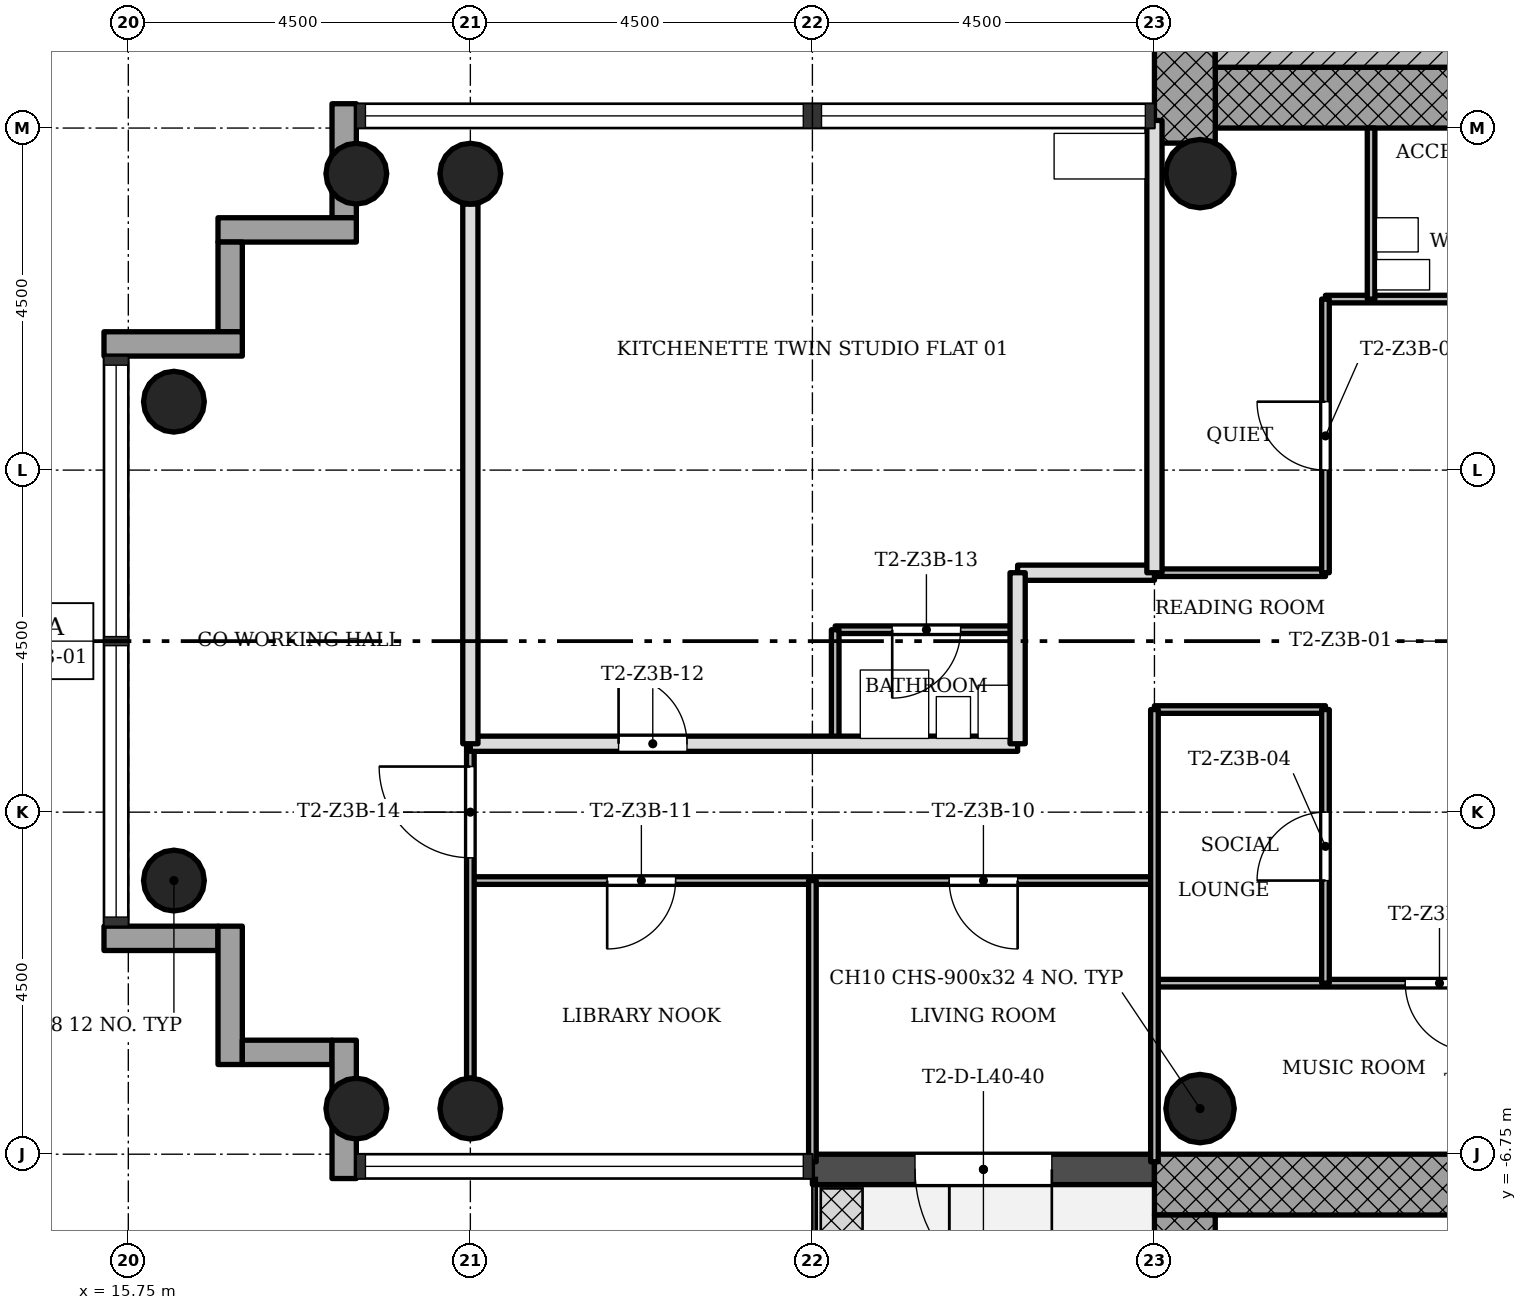
"""IFC4 building model, lengths in metres.
Left out: names, types, materials, properties, quantities, classifications, styles, units other than length and angle.
Written with IfcOpenShell. Run it as: python <this file> out.ifc"""

import sys

from ifc_helpers import new_model, si_unit, direction, frame, frame_2d, origin, origin_2d, place, context, subcontext, project, spatial, rectangle, hollow_circle, extrude, element, fill, save


model = new_model("IFC4")
c1 = context("Model", 3, precision=1e-05, world=origin(), true_north=direction((0.0, 1.0)))
c2 = subcontext(c1, "Body", "Model", "MODEL_VIEW")
j1 = project(units=[si_unit("LENGTHUNIT", "METRE"), si_unit("PLANEANGLEUNIT", "RADIAN")], contexts=[c1])
p1 = place(None, origin())
s1 = spatial("IfcSite", under=j1, at=p1, CompositionType="ELEMENT")
p2 = place(p1, origin())
s2 = spatial("IfcBuilding", under=s1, at=p2, CompositionType="ELEMENT")
p3 = place(p2, frame((0.0, 0.0, 147.3)))
s3 = spatial("IfcBuildingStorey", under=s2, at=p3, CompositionType="ELEMENT", Elevation=147.3)
p4 = place(p3, frame((30.05, 7.15, 0.0), z_axis=(0.0, 0.0, 1.0), x_axis=(1.0, 0.0, 0.0)))
e1 = element("IfcWall", 1, at=p4, inside=s3, PredefinedType="SHEAR", context=c2, shape_type="SweptSolid", body=[
    extrude(rectangle(XDim=12.7, YDim=0.8, at=frame_2d((6.35, 0.0))), origin(), (0.0, 0.0, 1.0), 3.4),
])
p5 = place(p4, frame((5.05, 0.0, 0.0)))
e2 = element("IfcOpeningElement", 2, at=p5, cuts=e1, PredefinedType="OPENING", context=c2, shape_type="SweptSolid", body=[
    extrude(rectangle(XDim=1.8, YDim=2.1, at=frame_2d((0.9, 1.05))), frame((0.0, 0.41, 0.0), z_axis=(0.0, -1.0, 0.0), x_axis=(1.0, 0.0, 0.0)), (0.0, 0.0, 1.0), 0.82),
])
p6 = place(p3, frame((29.65, 15.348, 0.0), z_axis=(0.0, 0.0, 1.0), x_axis=(0.0, -1.0, 0.0)))
e3 = element("IfcWall", 3, at=p6, inside=s3, PredefinedType="SHEAR", context=c2, shape_type="SweptSolid", body=[
    extrude(rectangle(XDim=8.796, YDim=0.8, at=frame_2d((4.398, 0.0))), origin(), (0.0, 0.0, 1.0), 3.4),
])
p7 = place(p3, frame((41.95, -7.15, 0.0), z_axis=(0.0, 0.0, 1.0), x_axis=(-1.0, 0.0, 0.0)))
e4 = element("IfcWall", 4, at=p7, inside=s3, PredefinedType="SHEAR", context=c2, shape_type="SweptSolid", body=[
    extrude(rectangle(XDim=12.7, YDim=0.8, at=frame_2d((6.35, 0.0))), origin(), (0.0, 0.0, 1.0), 3.4),
])
p8 = place(p7, frame((5.05, 0.0, 0.0)))
e5 = element("IfcOpeningElement", 5, at=p8, cuts=e4, PredefinedType="OPENING", context=c2, shape_type="SweptSolid", body=[
    extrude(rectangle(XDim=1.8, YDim=2.1, at=frame_2d((0.9, 1.05))), frame((0.0, 0.41, 0.0), z_axis=(0.0, -1.0, 0.0), x_axis=(1.0, 0.0, 0.0)), (0.0, 0.0, 1.0), 0.82),
])
p9 = place(p3, frame((29.65, -7.55, 0.0), z_axis=(0.0, 0.0, 1.0), x_axis=(0.0, -1.0, 0.0)))
e6 = element("IfcWall", 6, at=p9, inside=s3, PredefinedType="SHEAR", context=c2, shape_type="SweptSolid", body=[
    extrude(rectangle(XDim=8.2, YDim=0.8, at=frame_2d((4.1, 0.0))), origin(), (0.0, 0.0, 1.0), 3.4),
])
for number, where, z_axis, x_axis in (
    (7, (20.25, 6.15, 0.0), (0.0, 0.0, 1.0), (1.0, 0.0, 0.0)),
    (8, (20.25, -6.15, 0.0), (0.0, 0.0, 1.0), (1.0, 0.0, 0.0)),
    (9, (18.75, 6.15, 0.0), (0.0, 0.0, 1.0), (1.0, 0.0, 0.0)),
    (10, (18.75, -6.15, 0.0), (0.0, 0.0, 1.0), (1.0, 0.0, 0.0)),
    (11, (16.35, 3.15, 0.0), (0.0, 0.0, 1.0), (1.0, 0.0, 0.0)),
    (12, (16.35, -3.15, 0.0), (0.0, 0.0, 1.0), (1.0, 0.0, 0.0)),
):
    element("IfcColumn", number, at=place(p3, frame(where, z_axis=z_axis, x_axis=x_axis)), inside=s3, PredefinedType="COLUMN", context=c2, shape_type="SweptSolid", body=[
        extrude(hollow_circle(Radius=0.4, WallThickness=0.028, at=origin_2d()), origin(), (0.0, 0.0, 1.0), 3.4),
    ])
for number, where, z_axis, x_axis in (
    (13, (29.85, 6.15, 0.0), (0.0, 0.0, 1.0), (1.0, 0.0, 0.0)),
    (14, (29.85, -6.15, 0.0), (0.0, 0.0, 1.0), (1.0, 0.0, 0.0)),
):
    element("IfcColumn", number, at=place(p3, frame(where, z_axis=z_axis, x_axis=x_axis)), inside=s3, PredefinedType="COLUMN", context=c2, shape_type="SweptSolid", body=[
        extrude(hollow_circle(Radius=0.45, WallThickness=0.032, at=origin_2d()), origin(), (0.0, 0.0, 1.0), 3.4),
    ])
p10 = place(p3, frame((18.59, 7.07, -0.3), z_axis=(0.0, 0.0, 1.0), x_axis=(0.0, -1.0, 0.0)))
e15 = element("IfcWall", 15, at=p10, inside=s3, PredefinedType="STANDARD", context=c2, shape_type="SweptSolid", body=[
    extrude(rectangle(XDim=1.5, YDim=0.32, at=frame_2d((0.75, 0.0))), origin(), (0.0, 0.0, 1.0), 3.4),
])
p11 = place(p3, frame((18.75, 5.41, -0.3), z_axis=(0.0, 0.0, 1.0), x_axis=(-1.0, 0.0, 0.0)))
e16 = element("IfcWall", 16, at=p11, inside=s3, PredefinedType="STANDARD", context=c2, shape_type="SweptSolid", body=[
    extrude(rectangle(XDim=1.82, YDim=0.32, at=frame_2d((0.91, 0.0))), origin(), (0.0, 0.0, 1.0), 3.4),
])
p12 = place(p3, frame((17.09, 5.25, -0.3), z_axis=(0.0, 0.0, 1.0), x_axis=(0.0, -1.0, 0.0)))
e17 = element("IfcWall", 17, at=p12, inside=s3, PredefinedType="STANDARD", context=c2, shape_type="SweptSolid", body=[
    extrude(rectangle(XDim=1.18, YDim=0.32, at=frame_2d((0.59, 0.0))), origin(), (0.0, 0.0, 1.0), 3.4),
])
p13 = place(p3, frame((17.25, 3.91, -0.3), z_axis=(0.0, 0.0, 1.0), x_axis=(-1.0, 0.0, 0.0)))
e18 = element("IfcWall", 18, at=p13, inside=s3, PredefinedType="STANDARD", context=c2, shape_type="SweptSolid", body=[
    extrude(rectangle(XDim=1.82, YDim=0.32, at=frame_2d((0.91, 0.0))), origin(), (0.0, 0.0, 1.0), 3.4),
])
p14 = place(p3, frame((15.43, -3.91, -0.3), z_axis=(0.0, 0.0, 1.0), x_axis=(1.0, 0.0, 0.0)))
e19 = element("IfcWall", 19, at=p14, inside=s3, PredefinedType="STANDARD", context=c2, shape_type="SweptSolid", body=[
    extrude(rectangle(XDim=1.5, YDim=0.32, at=frame_2d((0.75, 0.0))), origin(), (0.0, 0.0, 1.0), 3.4),
])
p15 = place(p3, frame((17.09, -3.75, -0.3), z_axis=(0.0, 0.0, 1.0), x_axis=(0.0, -1.0, 0.0)))
e20 = element("IfcWall", 20, at=p15, inside=s3, PredefinedType="STANDARD", context=c2, shape_type="SweptSolid", body=[
    extrude(rectangle(XDim=1.82, YDim=0.32, at=frame_2d((0.91, 0.0))), origin(), (0.0, 0.0, 1.0), 3.4),
])
p16 = place(p3, frame((17.25, -5.41, -0.3), z_axis=(0.0, 0.0, 1.0), x_axis=(1.0, 0.0, 0.0)))
e21 = element("IfcWall", 21, at=p16, inside=s3, PredefinedType="STANDARD", context=c2, shape_type="SweptSolid", body=[
    extrude(rectangle(XDim=1.18, YDim=0.32, at=frame_2d((0.59, 0.0))), origin(), (0.0, 0.0, 1.0), 3.4),
])
p17 = place(p3, frame((18.59, -5.25, -0.3), z_axis=(0.0, 0.0, 1.0), x_axis=(0.0, -1.0, 0.0)))
e22 = element("IfcWall", 22, at=p17, inside=s3, PredefinedType="STANDARD", context=c2, shape_type="SweptSolid", body=[
    extrude(rectangle(XDim=1.82, YDim=0.32, at=frame_2d((0.91, 0.0))), origin(), (0.0, 0.0, 1.0), 3.4),
])
p18 = place(p3, frame((24.75, -6.95, -0.02), z_axis=(0.0, 0.0, 1.0), x_axis=(1.0, 0.0, 0.0)))
e23 = element("IfcWall", 23, at=p18, inside=s3, PredefinedType="STANDARD", context=c2, shape_type="SweptSolid", body=[
    extrude(rectangle(XDim=4.5, YDim=0.4, at=frame_2d((2.25, 0.0))), origin(), (0.0, 0.0, 1.0), 3.12),
])
p19 = place(p18, frame((1.35, 0.0, 0.02)))
e24 = element("IfcOpeningElement", 24, at=p19, cuts=e23, PredefinedType="OPENING", context=c2, shape_type="SweptSolid", body=[
    extrude(rectangle(XDim=1.8, YDim=2.1, at=frame_2d((0.9, 1.05))), frame((0.0, 0.21, 0.0), z_axis=(0.0, -1.0, 0.0), x_axis=(1.0, 0.0, 0.0)), (0.0, 0.0, 1.0), 0.42),
])
p20 = place(p3, frame((34.5, -4.5, 0.0), z_axis=(0.0, 0.0, 1.0), x_axis=(-1.0, 0.0, 0.0)))
e25 = element("IfcWall", 25, at=p20, inside=s3, PredefinedType="PARTITIONING", context=c2, shape_type="SweptSolid", body=[
    extrude(rectangle(XDim=5.25, YDim=0.1, at=frame_2d((2.625, 0.0))), origin(), (0.0, 0.0, 1.0), 3.0),
])
p21 = place(p20, frame((1.05, 0.0, 0.0)))
e26 = element("IfcOpeningElement", 26, at=p21, cuts=e25, PredefinedType="OPENING", context=c2, shape_type="SweptSolid", body=[
    extrude(rectangle(XDim=0.9, YDim=2.1, at=frame_2d((0.45, 1.05))), frame((0.0, 0.06, 0.0), z_axis=(0.0, -1.0, 0.0), x_axis=(1.0, 0.0, 0.0)), (0.0, 0.0, 1.0), 0.12),
])
p22 = place(p3, frame((29.25, -3.15, 0.0), z_axis=(0.0, 0.0, 1.0), x_axis=(-1.0, 0.0, 0.0)))
e27 = element("IfcWall", 27, at=p22, inside=s3, PredefinedType="PARTITIONING", context=c2, shape_type="SweptSolid", body=[
    extrude(rectangle(XDim=9.0, YDim=0.1, at=frame_2d((4.5, 0.0))), origin(), (0.0, 0.0, 1.0), 3.0),
])
p23 = place(p22, frame((1.8, 0.0, 0.0)))
e28 = element("IfcOpeningElement", 28, at=p23, cuts=e27, PredefinedType="OPENING", context=c2, shape_type="SweptSolid", body=[
    extrude(rectangle(XDim=0.9, YDim=2.1, at=frame_2d((0.45, 1.05))), frame((0.0, 0.06, 0.0), z_axis=(0.0, -1.0, 0.0), x_axis=(1.0, 0.0, 0.0)), (0.0, 0.0, 1.0), 0.12),
])
p24 = place(p22, frame((6.3, 0.0, 0.0)))
e29 = element("IfcOpeningElement", 29, at=p24, cuts=e27, PredefinedType="OPENING", context=c2, shape_type="SweptSolid", body=[
    extrude(rectangle(XDim=0.9, YDim=2.1, at=frame_2d((0.45, 1.05))), frame((0.0, 0.06, 0.0), z_axis=(0.0, -1.0, 0.0), x_axis=(1.0, 0.0, 0.0)), (0.0, 0.0, 1.0), 0.12),
])
p25 = place(p3, frame((27.45, -1.35, 0.0), z_axis=(0.0, 0.0, 1.0), x_axis=(-1.0, 0.0, 0.0)))
e30 = element("IfcWall", 30, at=p25, inside=s3, PredefinedType="SOLIDWALL", context=c2, shape_type="SweptSolid", body=[
    extrude(rectangle(XDim=7.2, YDim=0.2, at=frame_2d((3.6, 0.0))), origin(), (0.0, 0.0, 1.0), 3.0),
])
p26 = place(p25, frame((4.35, 0.0, 0.0)))
e31 = element("IfcOpeningElement", 31, at=p26, cuts=e30, PredefinedType="OPENING", context=c2, shape_type="SweptSolid", body=[
    extrude(rectangle(XDim=0.9, YDim=2.1, at=frame_2d((0.45, 1.05))), frame((0.0, 0.11, 0.0), z_axis=(0.0, -1.0, 0.0), x_axis=(1.0, 0.0, 0.0)), (0.0, 0.0, 1.0), 0.22),
])
p27 = place(p3, frame((31.5, -0.9, 0.0), z_axis=(0.0, 0.0, 1.0), x_axis=(-1.0, 0.0, 0.0)))
e32 = element("IfcWall", 32, at=p27, inside=s3, PredefinedType="PARTITIONING", context=c2, shape_type="SweptSolid", body=[
    extrude(rectangle(XDim=2.25, YDim=0.1, at=frame_2d((1.125, 0.0))), origin(), (0.0, 0.0, 1.0), 3.0),
])
p28 = place(p3, frame((27.45, 0.15, 0.0), z_axis=(0.0, 0.0, 1.0), x_axis=(-1.0, 0.0, 0.0)))
e33 = element("IfcWall", 33, at=p28, inside=s3, PredefinedType="PARTITIONING", context=c2, shape_type="SweptSolid", body=[
    extrude(rectangle(XDim=2.4, YDim=0.1, at=frame_2d((1.2, 0.0))), origin(), (0.0, 0.0, 1.0), 3.0),
])
p29 = place(p28, frame((0.75, 0.0, 0.0)))
e34 = element("IfcOpeningElement", 34, at=p29, cuts=e33, PredefinedType="OPENING", context=c2, shape_type="SweptSolid", body=[
    extrude(rectangle(XDim=0.9, YDim=2.1, at=frame_2d((0.45, 1.05))), frame((0.0, 0.06, 0.0), z_axis=(0.0, -1.0, 0.0), x_axis=(1.0, 0.0, 0.0)), (0.0, 0.0, 1.0), 0.12),
])
p30 = place(p3, frame((31.5, 0.9, 0.0), z_axis=(0.0, 0.0, 1.0), x_axis=(-1.0, 0.0, 0.0)))
e35 = element("IfcWall", 35, at=p30, inside=s3, PredefinedType="PARTITIONING", context=c2, shape_type="SweptSolid", body=[
    extrude(rectangle(XDim=2.25, YDim=0.1, at=frame_2d((1.125, 0.0))), origin(), (0.0, 0.0, 1.0), 3.0),
])
p31 = place(p3, frame((29.25, 0.9, 0.0), z_axis=(0.0, 0.0, 1.0), x_axis=(-1.0, 0.0, 0.0)))
e36 = element("IfcWall", 36, at=p31, inside=s3, PredefinedType="SOLIDWALL", context=c2, shape_type="SweptSolid", body=[
    extrude(rectangle(XDim=1.8, YDim=0.2, at=frame_2d((0.9, 0.0))), origin(), (0.0, 0.0, 1.0), 3.0),
])
p32 = place(p3, frame((34.5, 4.5, 0.0), z_axis=(0.0, 0.0, 1.0), x_axis=(-1.0, 0.0, 0.0)))
e37 = element("IfcWall", 37, at=p32, inside=s3, PredefinedType="PARTITIONING", context=c2, shape_type="SweptSolid", body=[
    extrude(rectangle(XDim=3.0, YDim=0.1, at=frame_2d((1.5, 0.0))), origin(), (0.0, 0.0, 1.0), 3.0),
])
p33 = place(p3, frame((32.1, 4.5, 0.0), z_axis=(0.0, 0.0, 1.0), x_axis=(0.0, 1.0, 0.0)))
e38 = element("IfcWall", 38, at=p33, inside=s3, PredefinedType="PARTITIONING", context=c2, shape_type="SweptSolid", body=[
    extrude(rectangle(XDim=2.25, YDim=0.1, at=frame_2d((1.125, 0.0))), origin(), (0.0, 0.0, 1.0), 3.0),
])
p34 = place(p3, frame((31.5, -4.5, 0.0), z_axis=(0.0, 0.0, 1.0), x_axis=(0.0, 1.0, 0.0)))
e39 = element("IfcWall", 39, at=p34, inside=s3, PredefinedType="PARTITIONING", context=c2, shape_type="SweptSolid", body=[
    extrude(rectangle(XDim=3.6, YDim=0.1, at=frame_2d((1.8, 0.0))), origin(), (0.0, 0.0, 1.0), 3.0),
])
p35 = place(p34, frame((1.35, 0.0, 0.0)))
e40 = element("IfcOpeningElement", 40, at=p35, cuts=e39, PredefinedType="OPENING", context=c2, shape_type="SweptSolid", body=[
    extrude(rectangle(XDim=0.9, YDim=2.1, at=frame_2d((0.45, 1.05))), frame((0.0, 0.06, 0.0), z_axis=(0.0, -1.0, 0.0), x_axis=(1.0, 0.0, 0.0)), (0.0, 0.0, 1.0), 0.12),
])
p36 = place(p3, frame((31.5, 0.9, 0.0), z_axis=(0.0, 0.0, 1.0), x_axis=(0.0, 1.0, 0.0)))
e41 = element("IfcWall", 41, at=p36, inside=s3, PredefinedType="PARTITIONING", context=c2, shape_type="SweptSolid", body=[
    extrude(rectangle(XDim=3.6, YDim=0.1, at=frame_2d((1.8, 0.0))), origin(), (0.0, 0.0, 1.0), 3.0),
])
p37 = place(p36, frame((1.35, 0.0, 0.0)))
e42 = element("IfcOpeningElement", 42, at=p37, cuts=e41, PredefinedType="OPENING", context=c2, shape_type="SweptSolid", body=[
    extrude(rectangle(XDim=0.9, YDim=2.1, at=frame_2d((0.45, 1.05))), frame((0.0, 0.06, 0.0), z_axis=(0.0, -1.0, 0.0), x_axis=(1.0, 0.0, 0.0)), (0.0, 0.0, 1.0), 0.12),
])
p38 = place(p3, frame((29.25, -6.85, 0.0), z_axis=(0.0, 0.0, 1.0), x_axis=(0.0, 1.0, 0.0)))
e43 = element("IfcWall", 43, at=p38, inside=s3, PredefinedType="PARTITIONING", context=c2, shape_type="SweptSolid", body=[
    extrude(rectangle(XDim=5.95, YDim=0.1, at=frame_2d((2.975, 0.0))), origin(), (0.0, 0.0, 1.0), 3.0),
])
p39 = place(p3, frame((29.25, 0.9, 0.0), z_axis=(0.0, 0.0, 1.0), x_axis=(0.0, 1.0, 0.0)))
e44 = element("IfcWall", 44, at=p39, inside=s3, PredefinedType="SOLIDWALL", context=c2, shape_type="SweptSolid", body=[
    extrude(rectangle(XDim=5.95, YDim=0.2, at=frame_2d((2.975, 0.0))), origin(), (0.0, 0.0, 1.0), 3.0),
])
p40 = place(p3, frame((27.45, -1.35, 0.0), z_axis=(0.0, 0.0, 1.0), x_axis=(0.0, 1.0, 0.0)))
e45 = element("IfcWall", 45, at=p40, inside=s3, PredefinedType="SOLIDWALL", context=c2, shape_type="SweptSolid", body=[
    extrude(rectangle(XDim=2.25, YDim=0.2, at=frame_2d((1.125, 0.0))), origin(), (0.0, 0.0, 1.0), 3.0),
])
p41 = place(p3, frame((25.05, -1.35, 0.0), z_axis=(0.0, 0.0, 1.0), x_axis=(0.0, 1.0, 0.0)))
e46 = element("IfcWall", 46, at=p41, inside=s3, PredefinedType="PARTITIONING", context=c2, shape_type="SweptSolid", body=[
    extrude(rectangle(XDim=1.5, YDim=0.1, at=frame_2d((0.75, 0.0))), origin(), (0.0, 0.0, 1.0), 3.0),
])
p42 = place(p3, frame((24.75, -6.85, 0.0), z_axis=(0.0, 0.0, 1.0), x_axis=(0.0, 1.0, 0.0)))
e47 = element("IfcWall", 47, at=p42, inside=s3, PredefinedType="PARTITIONING", context=c2, shape_type="SweptSolid", body=[
    extrude(rectangle(XDim=3.7, YDim=0.1, at=frame_2d((1.85, 0.0))), origin(), (0.0, 0.0, 1.0), 3.0),
])
p43 = place(p3, frame((20.25, -5.75, 0.0), z_axis=(0.0, 0.0, 1.0), x_axis=(0.0, 1.0, 0.0)))
e48 = element("IfcWall", 48, at=p43, inside=s3, PredefinedType="PARTITIONING", context=c2, shape_type="SweptSolid", body=[
    extrude(rectangle(XDim=4.4, YDim=0.1, at=frame_2d((2.2, 0.0))), origin(), (0.0, 0.0, 1.0), 3.0),
])
p44 = place(p43, frame((2.9, 0.0, 0.0)))
e49 = element("IfcOpeningElement", 49, at=p44, cuts=e48, PredefinedType="OPENING", context=c2, shape_type="SweptSolid", body=[
    extrude(rectangle(XDim=1.2, YDim=2.1, at=frame_2d((0.6, 1.05))), frame((0.0, 0.06, 0.0), z_axis=(0.0, -1.0, 0.0), x_axis=(1.0, 0.0, 0.0)), (0.0, 0.0, 1.0), 0.12),
])
p45 = place(p3, frame((20.25, -1.35, 0.0), z_axis=(0.0, 0.0, 1.0), x_axis=(0.0, 1.0, 0.0)))
e50 = element("IfcWall", 50, at=p45, inside=s3, PredefinedType="SOLIDWALL", context=c2, shape_type="SweptSolid", body=[
    extrude(rectangle(XDim=7.1, YDim=0.2, at=frame_2d((3.55, 0.0))), origin(), (0.0, 0.0, 1.0), 3.0),
])
p46 = place(p3, frame((34.15, 7.75, 0.0), z_axis=(0.0, 0.0, 1.0), x_axis=(-1.0, 0.0, 0.0)))
e51 = element("IfcWall", 51, at=p46, inside=s3, PredefinedType="SHEAR", context=c2, shape_type="SweptSolid", body=[
    extrude(rectangle(XDim=4.1, YDim=0.4, at=frame_2d((2.05, 0.0))), origin(), (0.0, 0.0, 1.0), 3.4),
])
p47 = place(p19, origin())
e52 = element("IfcDoor", 52, at=p47, inside=s3, OperationType="SINGLE_SWING_RIGHT", PredefinedType="DOOR", context=c2, shape_type="SweptSolid", body=[
    extrude(rectangle(XDim=1.8, YDim=2.1, at=frame_2d((0.9, 1.05))), frame((0.0, 0.025, 0.0), z_axis=(0.0, -1.0, 0.0), x_axis=(1.0, 0.0, 0.0)), (0.0, 0.0, 1.0), 0.05),
])
fill(e24, e52)
p48 = place(p37, origin())
e53 = element("IfcDoor", 53, at=p48, inside=s3, OperationType="SINGLE_SWING_LEFT", PredefinedType="DOOR", context=c2, shape_type="SweptSolid", body=[
    extrude(rectangle(XDim=0.9, YDim=2.1, at=frame_2d((0.45, 1.05))), frame((0.0, 0.025, 0.0), z_axis=(0.0, -1.0, 0.0), x_axis=(1.0, 0.0, 0.0)), (0.0, 0.0, 1.0), 0.05),
])
fill(e42, e53)
p49 = place(p35, origin())
e54 = element("IfcDoor", 54, at=p49, inside=s3, OperationType="SINGLE_SWING_RIGHT", PredefinedType="DOOR", context=c2, shape_type="SweptSolid", body=[
    extrude(rectangle(XDim=0.9, YDim=2.1, at=frame_2d((0.45, 1.05))), frame((0.0, 0.025, 0.0), z_axis=(0.0, -1.0, 0.0), x_axis=(1.0, 0.0, 0.0)), (0.0, 0.0, 1.0), 0.05),
])
fill(e40, e54)
p50 = place(p21, origin())
e55 = element("IfcDoor", 55, at=p50, inside=s3, OperationType="SINGLE_SWING_RIGHT", PredefinedType="DOOR", context=c2, shape_type="SweptSolid", body=[
    extrude(rectangle(XDim=0.9, YDim=2.1, at=frame_2d((0.45, 1.05))), frame((0.0, 0.025, 0.0), z_axis=(0.0, -1.0, 0.0), x_axis=(1.0, 0.0, 0.0)), (0.0, 0.0, 1.0), 0.05),
])
fill(e26, e55)
p51 = place(p23, origin())
e56 = element("IfcDoor", 56, at=p51, inside=s3, OperationType="SINGLE_SWING_RIGHT", PredefinedType="DOOR", context=c2, shape_type="SweptSolid", body=[
    extrude(rectangle(XDim=0.9, YDim=2.1, at=frame_2d((0.45, 1.05))), frame((0.0, 0.025, 0.0), z_axis=(0.0, -1.0, 0.0), x_axis=(1.0, 0.0, 0.0)), (0.0, 0.0, 1.0), 0.05),
])
fill(e28, e56)
p52 = place(p24, origin())
e57 = element("IfcDoor", 57, at=p52, inside=s3, OperationType="SINGLE_SWING_LEFT", PredefinedType="DOOR", context=c2, shape_type="SweptSolid", body=[
    extrude(rectangle(XDim=0.9, YDim=2.1, at=frame_2d((0.45, 1.05))), frame((0.0, 0.025, 0.0), z_axis=(0.0, -1.0, 0.0), x_axis=(1.0, 0.0, 0.0)), (0.0, 0.0, 1.0), 0.05),
])
fill(e29, e57)
p53 = place(p26, origin())
e58 = element("IfcDoor", 58, at=p53, inside=s3, OperationType="SINGLE_SWING_RIGHT", PredefinedType="DOOR", context=c2, shape_type="SweptSolid", body=[
    extrude(rectangle(XDim=0.9, YDim=2.1, at=frame_2d((0.45, 1.05))), frame((0.0, 0.025, 0.0), z_axis=(0.0, -1.0, 0.0), x_axis=(1.0, 0.0, 0.0)), (0.0, 0.0, 1.0), 0.05),
])
fill(e31, e58)
p54 = place(p29, origin())
e59 = element("IfcDoor", 59, at=p54, inside=s3, OperationType="SINGLE_SWING_LEFT", PredefinedType="DOOR", context=c2, shape_type="SweptSolid", body=[
    extrude(rectangle(XDim=0.9, YDim=2.1, at=frame_2d((0.45, 1.05))), frame((0.0, 0.025, 0.0), z_axis=(0.0, -1.0, 0.0), x_axis=(1.0, 0.0, 0.0)), (0.0, 0.0, 1.0), 0.05),
])
fill(e34, e59)
p55 = place(p44, origin())
e60 = element("IfcDoor", 60, at=p55, inside=s3, OperationType="SINGLE_SWING_LEFT", PredefinedType="DOOR", context=c2, shape_type="SweptSolid", body=[
    extrude(rectangle(XDim=1.2, YDim=2.1, at=frame_2d((0.6, 1.05))), frame((0.0, 0.025, 0.0), z_axis=(0.0, -1.0, 0.0), x_axis=(1.0, 0.0, 0.0)), (0.0, 0.0, 1.0), 0.05),
])
fill(e49, e60)
save(model, sys.argv[1])
